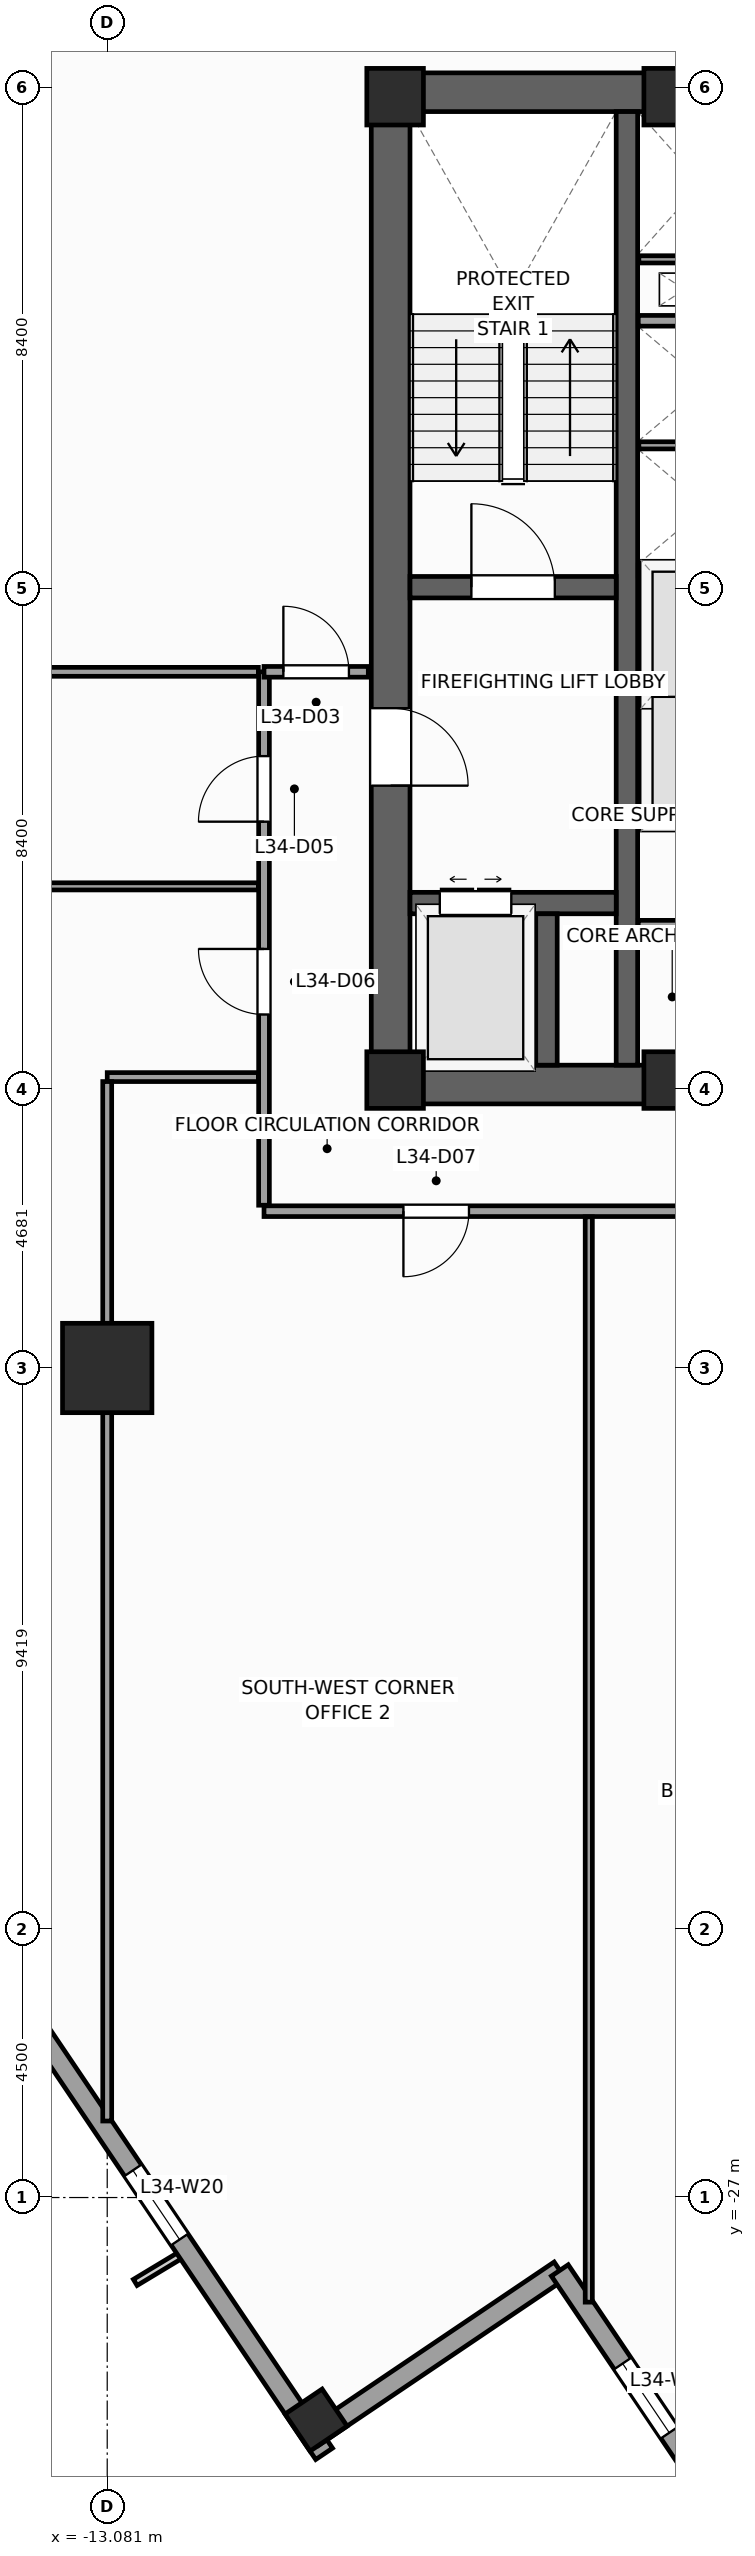
"""IFC4 building model, lengths in metres.
Left out: names, types, materials, properties, quantities, classifications, styles, units other than length and angle.
Written with IfcOpenShell. Run it as: python <this file> out.ifc"""

import sys

from ifc_helpers import new_model, si_unit, direction, frame, frame_2d, origin, origin_2d, place, context, subcontext, project, spatial, rectangle, extrude, source, transform, mapped, element, fill, save


model = new_model("IFC4")
c1 = context("Model", 3, precision=1e-05, world=origin(), true_north=direction((0.0, 1.0)))
c2 = subcontext(c1, "Body", "Model", "MODEL_VIEW")
j1 = project(units=[si_unit("LENGTHUNIT", "METRE"), si_unit("PLANEANGLEUNIT", "RADIAN")], contexts=[c1])
p1 = place(None, origin())
s1 = spatial("IfcSite", under=j1, at=p1, CompositionType="ELEMENT")
p2 = place(p1, origin())
s2 = spatial("IfcBuilding", under=s1, at=p2, CompositionType="ELEMENT")
p3 = place(p2, frame((0.0, 0.0, 144.4)))
s3 = spatial("IfcBuildingStorey", under=s2, at=p3, CompositionType="ELEMENT", Elevation=144.4)
p4 = place(p3, frame((-8.65, -8.325, 0.0), z_axis=(0.0, 0.0, 1.0), x_axis=(1.0, 0.0, 0.0)))
e1 = element("IfcWall", 1, at=p4, inside=s3, PredefinedType="SHEAR", context=c2, shape_type="SweptSolid", body=[
    extrude(rectangle(XDim=17.3, YDim=0.65, at=frame_2d((8.65, 0.0))), origin(), (0.0, 0.0, 1.0), 4.0),
])
p5 = place(p4, frame((8.0, 0.0, 0.0)))
e2 = element("IfcOpeningElement", 2, at=p5, cuts=e1, PredefinedType="OPENING", context=c2, shape_type="SweptSolid", body=[
    extrude(rectangle(XDim=1.3, YDim=2.2, at=frame_2d((0.65, 1.1))), frame((0.0, 0.335, 0.0), z_axis=(0.0, -1.0, 0.0), x_axis=(1.0, 0.0, 0.0)), (0.0, 0.0, 1.0), 0.67),
])
p6 = place(p3, frame((-8.65, 8.325, 0.0), z_axis=(0.0, 0.0, 1.0), x_axis=(1.0, 0.0, 0.0)))
e3 = element("IfcWall", 3, at=p6, inside=s3, PredefinedType="SHEAR", context=c2, shape_type="SweptSolid", body=[
    extrude(rectangle(XDim=17.3, YDim=0.65, at=frame_2d((8.65, 0.0))), origin(), (0.0, 0.0, 1.0), 4.0),
])
p7 = place(p3, frame((-8.325, -8.0, 0.0), z_axis=(0.0, 0.0, 1.0), x_axis=(0.0, 1.0, 0.0)))
e4 = element("IfcWall", 4, at=p7, inside=s3, PredefinedType="SHEAR", context=c2, shape_type="SweptSolid", body=[
    extrude(rectangle(XDim=16.0, YDim=0.65, at=frame_2d((8.0, 0.0))), origin(), (0.0, 0.0, 1.0), 4.0),
])
p8 = place(p7, frame((4.69, 0.0, 0.0)))
e5 = element("IfcOpeningElement", 5, at=p8, cuts=e4, PredefinedType="OPENING", context=c2, shape_type="SweptSolid", body=[
    extrude(rectangle(XDim=1.3, YDim=2.2, at=frame_2d((0.65, 1.1))), frame((0.0, 0.335, 0.0), z_axis=(0.0, -1.0, 0.0), x_axis=(1.0, 0.0, 0.0)), (0.0, 0.0, 1.0), 0.67),
])
p9 = place(p3, frame((-4.36, -8.0, 0.0), z_axis=(0.0, 0.0, 1.0), x_axis=(0.0, 1.0, 0.0)))
e6 = element("IfcWall", 6, at=p9, inside=s3, PredefinedType="SHEAR", context=c2, shape_type="SweptSolid", body=[
    extrude(rectangle(XDim=16.0, YDim=0.36, at=frame_2d((8.0, 0.0))), origin(), (0.0, 0.0, 1.0), 4.0),
])
p10 = place(p3, frame((-8.0, 0.02, 0.0), z_axis=(0.0, 0.0, 1.0), x_axis=(1.0, 0.0, 0.0)))
e7 = element("IfcWall", 7, at=p10, inside=s3, PredefinedType="SHEAR", context=c2, shape_type="SweptSolid", body=[
    extrude(rectangle(XDim=3.46, YDim=0.36, at=frame_2d((1.73, 0.0))), origin(), (0.0, 0.0, 1.0), 4.0),
])
p11 = place(p10, frame((1.03, 0.0, 0.0)))
e8 = element("IfcOpeningElement", 8, at=p11, cuts=e7, PredefinedType="OPENING", context=c2, shape_type="SweptSolid", body=[
    extrude(rectangle(XDim=1.4, YDim=2.2, at=frame_2d((0.7, 1.1))), frame((0.0, 0.19, 0.0), z_axis=(0.0, -1.0, 0.0), x_axis=(1.0, 0.0, 0.0)), (0.0, 0.0, 1.0), 0.38),
])
p12 = place(p3, frame((-8.0, -5.28, 0.0), z_axis=(0.0, 0.0, 1.0), x_axis=(1.0, 0.0, 0.0)))
e9 = element("IfcWall", 9, at=p12, inside=s3, PredefinedType="SHEAR", context=c2, shape_type="SweptSolid", body=[
    extrude(rectangle(XDim=3.46, YDim=0.36, at=frame_2d((1.73, 0.0))), origin(), (0.0, 0.0, 1.0), 4.0),
])
p13 = place(p12, frame((0.5, 0.0, 0.0)))
e10 = element("IfcOpeningElement", 10, at=p13, cuts=e9, PredefinedType="OPENING", context=c2, shape_type="SweptSolid", body=[
    extrude(rectangle(XDim=1.2, YDim=2.25, at=frame_2d((0.6, 1.125))), frame((0.0, 0.19, 0.0), z_axis=(0.0, -1.0, 0.0), x_axis=(1.0, 0.0, 0.0)), (0.0, 0.0, 1.0), 0.38),
])
p14 = place(p3, frame((-5.71, -8.0, 0.0), z_axis=(0.0, 0.0, 1.0), x_axis=(0.0, 1.0, 0.0)))
e11 = element("IfcWall", 11, at=p14, inside=s3, PredefinedType="SHEAR", context=c2, shape_type="SweptSolid", body=[
    extrude(rectangle(XDim=2.54, YDim=0.36, at=frame_2d((1.27, 0.0))), origin(), (0.0, 0.0, 1.0), 4.0),
])
m1 = source(origin(), c2, "Body", "SweptSolid", [
    extrude(rectangle(XDim=0.95, YDim=0.95, at=origin_2d()), origin(), (0.0, 0.0, 1.0), 4.0),
])
for number, where, z_axis, x_axis in (
    (12, (-8.25, -8.25, 0.0), (0.0, 0.0, 1.0), (1.0, 0.0, 0.0)),
    (13, (-8.25, 8.25, 0.0), (0.0, 0.0, 1.0), (1.0, 0.0, 0.0)),
    (14, (-3.6, -8.25, 0.0), (0.0, 0.0, 1.0), (1.0, 0.0, 0.0)),
    (15, (-3.6, 8.25, 0.0), (0.0, 0.0, 1.0), (1.0, 0.0, 0.0)),
):
    element("IfcColumn", number, at=place(p3, frame(where, z_axis=z_axis, x_axis=x_axis)), inside=s3, PredefinedType="PILASTER", context=c2, shape_type="MappedRepresentation", body=[
        mapped(m1, transform((0.0, 0.0, 0.0), scale=1.0)),
    ])
m2 = source(origin(), c2, "Body", "SweptSolid", [
    extrude(rectangle(XDim=1.5, YDim=1.5, at=origin_2d()), origin(), (0.0, 0.0, 1.0), 4.0),
])
p15 = place(p3, frame((-13.081, -13.081, 0.0), z_axis=(0.0, 0.0, 1.0), x_axis=(1.0, 0.0, 0.0)))
e16 = element("IfcColumn", 16, at=p15, inside=s3, PredefinedType="COLUMN", context=c2, shape_type="MappedRepresentation", body=[
    mapped(m2, transform((0.0, 0.0, 0.0), scale=1.0)),
])
m3 = source(origin(), c2, "Body", "SweptSolid", [
    extrude(rectangle(XDim=0.75, YDim=0.75, at=origin_2d()), origin(), (0.0, 0.0, 1.0), 4.0),
])
p16 = place(p3, frame((-9.576, -30.734, 0.0), z_axis=(0.0, 0.0, 1.0), x_axis=(0.829037572555, 0.559192903471, 0.0)))
e17 = element("IfcColumn", 17, at=p16, inside=s3, PredefinedType="COLUMN", context=c2, shape_type="MappedRepresentation", body=[
    mapped(m3, transform((0.0, 0.0, 0.0), scale=1.0)),
])
p17 = place(p3, frame((-32.558, 2.972, 0.0), z_axis=(0.0, 0.0, 1.0), x_axis=(0.559194910251, -0.829036218961, 0.0)))
e18 = element("IfcWall", 18, at=p17, inside=s3, PredefinedType="STANDARD", context=c2, shape_type="SweptSolid", body=[
    extrude(rectangle(XDim=41.34, YDim=0.34, at=frame_2d((20.67, 0.0))), origin(), (0.0, 0.0, 1.0), 3.04),
])
p18 = place(p17, frame((25.745, 0.0, 0.0)))
e19 = element("IfcOpeningElement", 19, at=p18, cuts=e18, PredefinedType="OPENING", context=c2, shape_type="SweptSolid", body=[
    extrude(rectangle(XDim=1.05, YDim=2.25, at=frame_2d((0.525, 1.125))), frame((0.0, 0.18, 0.0), z_axis=(0.0, -1.0, 0.0), x_axis=(1.0, 0.0, 0.0)), (0.0, 0.0, 1.0), 0.36),
])
p19 = place(p17, frame((3.511, 0.0, 0.56)))
e20 = element("IfcOpeningElement", 20, at=p19, cuts=e18, PredefinedType="OPENING", context=c2, shape_type="SweptSolid", body=[
    extrude(rectangle(XDim=1.4, YDim=2.4, at=frame_2d((0.7, 1.2))), frame((0.0, 0.18, 0.0), z_axis=(0.0, -1.0, 0.0), x_axis=(1.0, 0.0, 0.0)), (0.0, 0.0, 1.0), 0.36),
])
p20 = place(p17, frame((11.064, 0.0, 0.61)))
e21 = element("IfcOpeningElement", 21, at=p20, cuts=e18, PredefinedType="OPENING", context=c2, shape_type="SweptSolid", body=[
    extrude(rectangle(XDim=1.85, YDim=2.35, at=frame_2d((0.925, 1.175))), frame((0.0, 0.18, 0.0), z_axis=(0.0, -1.0, 0.0), x_axis=(1.0, 0.0, 0.0)), (0.0, 0.0, 1.0), 0.36),
])
p21 = place(p17, frame((18.168, 0.0, 0.61)))
e22 = element("IfcOpeningElement", 22, at=p21, cuts=e18, PredefinedType="OPENING", context=c2, shape_type="SweptSolid", body=[
    extrude(rectangle(XDim=1.85, YDim=2.35, at=frame_2d((0.925, 1.175))), frame((0.0, 0.18, 0.0), z_axis=(0.0, -1.0, 0.0), x_axis=(1.0, 0.0, 0.0)), (0.0, 0.0, 1.0), 0.36),
])
p22 = place(p17, frame((27.936, 0.0, 0.61)))
e23 = element("IfcOpeningElement", 23, at=p22, cuts=e18, PredefinedType="OPENING", context=c2, shape_type="SweptSolid", body=[
    extrude(rectangle(XDim=1.85, YDim=2.35, at=frame_2d((0.925, 1.175))), frame((0.0, 0.18, 0.0), z_axis=(0.0, -1.0, 0.0), x_axis=(1.0, 0.0, 0.0)), (0.0, 0.0, 1.0), 0.36),
])
p23 = place(p17, frame((35.602, 0.0, 0.56)))
e24 = element("IfcOpeningElement", 24, at=p23, cuts=e18, PredefinedType="OPENING", context=c2, shape_type="SweptSolid", body=[
    extrude(rectangle(XDim=1.4, YDim=2.4, at=frame_2d((0.7, 1.2))), frame((0.0, 0.18, 0.0), z_axis=(0.0, -1.0, 0.0), x_axis=(1.0, 0.0, 0.0)), (0.0, 0.0, 1.0), 0.36),
])
p24 = place(p3, frame((-9.631, -31.019, 0.0), z_axis=(0.0, 0.0, 1.0), x_axis=(0.829025804298, 0.559210350234, 0.0)))
e25 = element("IfcWall", 25, at=p24, inside=s3, PredefinedType="STANDARD", context=c2, shape_type="SweptSolid", body=[
    extrude(rectangle(XDim=5.0, YDim=0.34, at=frame_2d((2.5, 0.0))), origin(), (0.0, 0.0, 1.0), 3.74),
])
p25 = place(p3, frame((-5.486, -28.223, 0.0), z_axis=(0.0, 0.0, 1.0), x_axis=(0.559171107879, -0.82905227345, 0.0)))
e26 = element("IfcWall", 26, at=p25, inside=s3, PredefinedType="STANDARD", context=c2, shape_type="SweptSolid", body=[
    extrude(rectangle(XDim=5.17, YDim=0.34, at=frame_2d((2.585, 0.0))), origin(), (0.0, 0.0, 1.0), 3.04),
])
p26 = place(p25, frame((1.885, 0.0, 0.56)))
e27 = element("IfcOpeningElement", 27, at=p26, cuts=e26, PredefinedType="OPENING", context=c2, shape_type="SweptSolid", body=[
    extrude(rectangle(XDim=1.4, YDim=2.4, at=frame_2d((0.7, 1.2))), frame((0.0, 0.18, 0.0), z_axis=(0.0, -1.0, 0.0), x_axis=(1.0, 0.0, 0.0)), (0.0, 0.0, 1.0), 0.36),
])
for number, where, z_axis, x_axis in (
    (28, (-4.17, -3.9, 0.0), (0.0, 0.0, 1.0), (1.0, 0.0, 0.0)),
    (29, (-4.17, 0.3, 0.0), (0.0, 0.0, 1.0), (1.0, 0.0, 0.0)),
    (30, (-4.17, 4.49, 0.0), (0.0, 0.0, 1.0), (1.0, 0.0, 0.0)),
):
    element("IfcWall", number, at=place(p3, frame(where, z_axis=z_axis, x_axis=x_axis)), inside=s3, PredefinedType="PARTITIONING", context=c2, shape_type="SweptSolid", body=[
        extrude(rectangle(XDim=2.28, YDim=0.18, at=frame_2d((1.14, 0.0))), origin(), (0.0, 0.0, 1.0), 3.74),
    ])
for number, where, z_axis, x_axis in (
    (31, (-4.16, -1.8, 0.0), (0.0, 0.0, 1.0), (1.0, 0.0, 0.0)),
    (32, (-4.16, 2.4, 0.0), (0.0, 0.0, 1.0), (1.0, 0.0, 0.0)),
):
    element("IfcWall", number, at=place(p3, frame(where, z_axis=z_axis, x_axis=x_axis)), inside=s3, PredefinedType="PARTITIONING", context=c2, shape_type="SweptSolid", body=[
        extrude(rectangle(XDim=2.26, YDim=0.12, at=frame_2d((1.13, 0.0))), origin(), (0.0, 0.0, 1.0), 3.74),
    ])
p27 = place(p3, frame((-4.17, -5.65, 0.0), z_axis=(0.0, 0.0, 1.0), x_axis=(1.0, 0.0, 0.0)))
e33 = element("IfcWall", 33, at=p27, inside=s3, PredefinedType="PARTITIONING", context=c2, shape_type="SweptSolid", body=[
    extrude(rectangle(XDim=2.28, YDim=0.16, at=frame_2d((1.14, 0.0))), origin(), (0.0, 0.0, 1.0), 3.74),
])
p28 = place(p3, frame((-4.16, 5.52, 0.0), z_axis=(0.0, 0.0, 1.0), x_axis=(1.0, 0.0, 0.0)))
e34 = element("IfcWall", 34, at=p28, inside=s3, PredefinedType="PARTITIONING", context=c2, shape_type="SweptSolid", body=[
    extrude(rectangle(XDim=2.1, YDim=0.12, at=frame_2d((1.05, 0.0))), origin(), (0.0, 0.0, 1.0), 3.74),
])
p29 = place(p3, frame((-10.45, -10.45, 0.0), z_axis=(0.0, 0.0, 1.0), x_axis=(1.0, 0.0, 0.0)))
e35 = element("IfcWall", 35, at=p29, inside=s3, PredefinedType="PARTITIONING", context=c2, shape_type="SweptSolid", body=[
    extrude(rectangle(XDim=20.9, YDim=0.18, at=frame_2d((10.45, 0.0))), origin(), (0.0, 0.0, 1.0), 3.74),
])
p30 = place(p29, frame((2.339, 0.0, 0.0)))
e36 = element("IfcOpeningElement", 36, at=p30, cuts=e35, PredefinedType="OPENING", context=c2, shape_type="SweptSolid", body=[
    extrude(rectangle(XDim=1.1, YDim=2.2, at=frame_2d((0.55, 1.1))), frame((0.0, 0.1, 0.0), z_axis=(0.0, -1.0, 0.0), x_axis=(1.0, 0.0, 0.0)), (0.0, 0.0, 1.0), 0.2),
])
p31 = place(p29, frame((7.4, 0.0, 0.0)))
e37 = element("IfcOpeningElement", 37, at=p31, cuts=e35, PredefinedType="OPENING", context=c2, shape_type="SweptSolid", body=[
    extrude(rectangle(XDim=1.1, YDim=2.2, at=frame_2d((0.55, 1.1))), frame((0.0, 0.1, 0.0), z_axis=(0.0, -1.0, 0.0), x_axis=(1.0, 0.0, 0.0)), (0.0, 0.0, 1.0), 0.2),
])
p32 = place(p29, frame((12.4, 0.0, 0.0)))
e38 = element("IfcOpeningElement", 38, at=p32, cuts=e35, PredefinedType="OPENING", context=c2, shape_type="SweptSolid", body=[
    extrude(rectangle(XDim=1.1, YDim=2.2, at=frame_2d((0.55, 1.1))), frame((0.0, 0.1, 0.0), z_axis=(0.0, -1.0, 0.0), x_axis=(1.0, 0.0, 0.0)), (0.0, 0.0, 1.0), 0.2),
])
p33 = place(p29, frame((17.46, 0.0, 0.0)))
e39 = element("IfcOpeningElement", 39, at=p33, cuts=e35, PredefinedType="OPENING", context=c2, shape_type="SweptSolid", body=[
    extrude(rectangle(XDim=1.1, YDim=2.2, at=frame_2d((0.55, 1.1))), frame((0.0, 0.1, 0.0), z_axis=(0.0, -1.0, 0.0), x_axis=(1.0, 0.0, 0.0)), (0.0, 0.0, 1.0), 0.2),
])
p34 = place(p3, frame((-10.45, -10.35, 0.0), z_axis=(0.0, 0.0, 1.0), x_axis=(0.0, 1.0, 0.0)))
e40 = element("IfcWall", 40, at=p34, inside=s3, PredefinedType="PARTITIONING", context=c2, shape_type="SweptSolid", body=[
    extrude(rectangle(XDim=8.95, YDim=0.18, at=frame_2d((4.475, 0.0))), origin(), (0.0, 0.0, 1.0), 3.74),
])
p35 = place(p34, frame((6.436, 0.0, 0.0)))
e41 = element("IfcOpeningElement", 41, at=p35, cuts=e40, PredefinedType="OPENING", context=c2, shape_type="SweptSolid", body=[
    extrude(rectangle(XDim=1.1, YDim=2.2, at=frame_2d((0.55, 1.1))), frame((0.0, 0.1, 0.0), z_axis=(0.0, -1.0, 0.0), x_axis=(1.0, 0.0, 0.0)), (0.0, 0.0, 1.0), 0.2),
])
p36 = place(p34, frame((3.2, 0.0, 0.0)))
e42 = element("IfcOpeningElement", 42, at=p36, cuts=e40, PredefinedType="OPENING", context=c2, shape_type="SweptSolid", body=[
    extrude(rectangle(XDim=1.1, YDim=2.2, at=frame_2d((0.55, 1.1))), frame((0.0, 0.1, 0.0), z_axis=(0.0, -1.0, 0.0), x_axis=(1.0, 0.0, 0.0)), (0.0, 0.0, 1.0), 0.2),
])
p37 = place(p3, frame((-10.45, -1.4, 0.0), z_axis=(0.0, 0.0, 1.0), x_axis=(1.0, 0.0, 0.0)))
e43 = element("IfcWall", 43, at=p37, inside=s3, PredefinedType="PARTITIONING", context=c2, shape_type="SweptSolid", body=[
    extrude(rectangle(XDim=1.75, YDim=0.18, at=frame_2d((0.875, 0.0))), origin(), (0.0, 0.0, 1.0), 3.74),
])
p38 = place(p37, frame((0.325, 0.0, 0.0)))
e44 = element("IfcOpeningElement", 44, at=p38, cuts=e43, PredefinedType="OPENING", context=c2, shape_type="SweptSolid", body=[
    extrude(rectangle(XDim=1.1, YDim=2.2, at=frame_2d((0.55, 1.1))), frame((0.0, 0.1, 0.0), z_axis=(0.0, -1.0, 0.0), x_axis=(1.0, 0.0, 0.0)), (0.0, 0.0, 1.0), 0.2),
])
p39 = place(p3, frame((-29.482, -1.4, 0.0), z_axis=(0.0, 0.0, 1.0), x_axis=(1.0, 0.0, 0.0)))
e45 = element("IfcWall", 45, at=p39, inside=s3, PredefinedType="PARTITIONING", context=c2, shape_type="SweptSolid", body=[
    extrude(rectangle(XDim=18.938, YDim=0.15, at=frame_2d((9.469, 0.0))), origin(), (0.0, 0.0, 1.0), 3.74),
])
p40 = place(p3, frame((-10.545, -8.2, 0.0), z_axis=(0.0, 0.0, 1.0), x_axis=(-1.0, 0.0, 0.0)))
e46 = element("IfcWall", 46, at=p40, inside=s3, PredefinedType="PARTITIONING", context=c2, shape_type="SweptSolid", body=[
    extrude(rectangle(XDim=2.536, YDim=0.15, at=frame_2d((1.268, 0.0))), origin(), (0.0, 0.0, 1.0), 3.74),
])
p41 = place(p3, frame((-13.081, -8.275, 0.0), z_axis=(0.0, 0.0, 1.0), x_axis=(0.0, -1.0, 0.0)))
e47 = element("IfcWall", 47, at=p41, inside=s3, PredefinedType="PARTITIONING", context=c2, shape_type="SweptSolid", body=[
    extrude(rectangle(XDim=17.441, YDim=0.15, at=frame_2d((8.721, 0.0))), origin(), (0.0, 0.0, 1.0), 2.84),
])
p42 = place(p3, frame((-27.054, -5.0, 0.0), z_axis=(0.0, 0.0, 1.0), x_axis=(1.0, 0.0, 0.0)))
e48 = element("IfcWall", 48, at=p42, inside=s3, PredefinedType="PARTITIONING", context=c2, shape_type="SweptSolid", body=[
    extrude(rectangle(XDim=16.509, YDim=0.12, at=frame_2d((8.255, 0.0))), origin(), (0.0, 0.0, 1.0), 3.74),
])
p43 = place(p3, frame((-5.0, -28.755, 0.0), z_axis=(0.0, 0.0, 1.0), x_axis=(0.0, 1.0, 0.0)))
e49 = element("IfcWall", 49, at=p43, inside=s3, PredefinedType="PARTITIONING", context=c2, shape_type="SweptSolid", body=[
    extrude(rectangle(XDim=18.21, YDim=0.12, at=frame_2d((9.105, 0.0))), origin(), (0.0, 0.0, 1.0), 3.74),
])
m4 = source(origin(), c2, "Body", "SweptSolid", [
    extrude(rectangle(XDim=1.4, YDim=2.4, at=frame_2d((0.7, 1.2))), frame((0.0, 0.03, 0.0), z_axis=(0.0, -1.0, 0.0), x_axis=(1.0, 0.0, 0.0)), (0.0, 0.0, 1.0), 0.06),
])
p44 = place(p23, origin())
e50 = element("IfcWindow", 50, at=p44, inside=s3, PartitioningType="SINGLE_PANEL", PredefinedType="WINDOW", context=c2, shape_type="MappedRepresentation", body=[
    mapped(m4, transform((0.0, 0.0, 0.0), scale=1.0)),
])
fill(e24, e50)
p45 = place(p26, origin())
e51 = element("IfcWindow", 51, at=p45, inside=s3, PartitioningType="SINGLE_PANEL", PredefinedType="WINDOW", context=c2, shape_type="MappedRepresentation", body=[
    mapped(m4, transform((0.0, 0.0, 0.0), scale=1.0)),
])
fill(e27, e51)
m5 = source(origin(), c2, "Body", "SweptSolid", [
    extrude(rectangle(XDim=1.4, YDim=2.2, at=frame_2d((0.7, 1.1))), frame((0.0, 0.025, 0.0), z_axis=(0.0, -1.0, 0.0), x_axis=(1.0, 0.0, 0.0)), (0.0, 0.0, 1.0), 0.05),
])
p46 = place(p11, origin())
e52 = element("IfcDoor", 52, at=p46, inside=s3, OperationType="SINGLE_SWING_LEFT", PredefinedType="DOOR", context=c2, shape_type="MappedRepresentation", body=[
    mapped(m5, transform((0.0, 0.0, 0.0), scale=1.0)),
])
fill(e8, e52)
m6 = source(origin(), c2, "Body", "SweptSolid", [
    extrude(rectangle(XDim=1.3, YDim=2.2, at=frame_2d((0.65, 1.1))), frame((0.0, 0.025, 0.0), z_axis=(0.0, -1.0, 0.0), x_axis=(1.0, 0.0, 0.0)), (0.0, 0.0, 1.0), 0.05),
])
p47 = place(p8, frame((1.3, 0.0, 0.0), z_axis=(0.0, 0.0, 1.0), x_axis=(-1.0, 0.0, 0.0)))
e53 = element("IfcDoor", 53, at=p47, inside=s3, OperationType="SINGLE_SWING_LEFT", PredefinedType="DOOR", context=c2, shape_type="MappedRepresentation", body=[
    mapped(m6, transform((0.0, 0.0, 0.0), scale=1.0)),
])
fill(e5, e53)
m7 = source(origin(), c2, "Body", "SweptSolid", [
    extrude(rectangle(XDim=1.2, YDim=2.25, at=frame_2d((0.6, 1.125))), frame((0.0, 0.025, 0.0), z_axis=(0.0, -1.0, 0.0), x_axis=(1.0, 0.0, 0.0)), (0.0, 0.0, 1.0), 0.05),
])
p48 = place(p13, origin())
e54 = element("IfcDoor", 54, at=p48, inside=s3, OperationType="DOUBLE_DOOR_SLIDING", PredefinedType="DOOR", context=c2, shape_type="MappedRepresentation", body=[
    mapped(m7, transform((0.0, 0.0, 0.0), scale=1.0)),
])
fill(e10, e54)
m8 = source(origin(), c2, "Body", "SweptSolid", [
    extrude(rectangle(XDim=1.1, YDim=2.2, at=frame_2d((0.55, 1.1))), frame((0.0, 0.025, 0.0), z_axis=(0.0, -1.0, 0.0), x_axis=(1.0, 0.0, 0.0)), (0.0, 0.0, 1.0), 0.05),
])
p49 = place(p38, origin())
e55 = element("IfcDoor", 55, at=p49, inside=s3, OperationType="SINGLE_SWING_LEFT", PredefinedType="DOOR", context=c2, shape_type="MappedRepresentation", body=[
    mapped(m8, transform((0.0, 0.0, 0.0), scale=1.0)),
])
fill(e44, e55)
p50 = place(p35, origin())
e56 = element("IfcDoor", 56, at=p50, inside=s3, OperationType="SINGLE_SWING_LEFT", PredefinedType="DOOR", context=c2, shape_type="MappedRepresentation", body=[
    mapped(m8, transform((0.0, 0.0, 0.0), scale=1.0)),
])
fill(e41, e56)
p51 = place(p36, origin())
e57 = element("IfcDoor", 57, at=p51, inside=s3, OperationType="SINGLE_SWING_RIGHT", PredefinedType="DOOR", context=c2, shape_type="MappedRepresentation", body=[
    mapped(m8, transform((0.0, 0.0, 0.0), scale=1.0)),
])
fill(e42, e57)
p52 = place(p30, frame((1.1, 0.0, 0.0), z_axis=(0.0, 0.0, 1.0), x_axis=(-1.0, 0.0, 0.0)))
e58 = element("IfcDoor", 58, at=p52, inside=s3, OperationType="SINGLE_SWING_LEFT", PredefinedType="DOOR", context=c2, shape_type="MappedRepresentation", body=[
    mapped(m8, transform((0.0, 0.0, 0.0), scale=1.0)),
])
fill(e36, e58)
save(model, sys.argv[1])
